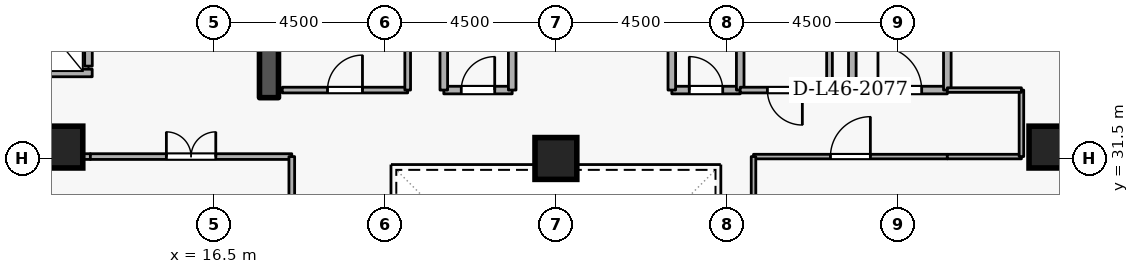
"""IFC4 building model, lengths in metres.
Left out: names, types, materials, properties, quantities, classifications, styles, units other than length and angle.
Written with IfcOpenShell. Run it as: python <this file> out.ifc"""

import sys

from ifc_helpers import new_model, si_unit, direction, frame, frame_2d, origin, origin_2d, place, context, subcontext, project, spatial, rectangle, extrude, element, fill, save


model = new_model("IFC4")
c1 = context("Model", 3, precision=1e-05, world=origin(), true_north=direction((0.0, 1.0)))
c2 = subcontext(c1, "Body", "Model", "MODEL_VIEW")
j1 = project(units=[si_unit("LENGTHUNIT", "METRE"), si_unit("PLANEANGLEUNIT", "RADIAN")], contexts=[c1])
p1 = place(None, origin())
s1 = spatial("IfcSite", under=j1, at=p1, CompositionType="ELEMENT")
p2 = place(p1, origin())
s2 = spatial("IfcBuilding", under=s1, at=p2, CompositionType="ELEMENT")
p3 = place(p2, frame((0.0, 0.0, 174.3)))
s3 = spatial("IfcBuildingStorey", under=s2, at=p3, CompositionType="ELEMENT", Elevation=174.3)
p4 = place(p3, frame((17.95, 33.1, 0.0), z_axis=(0.0, 0.0, 1.0), x_axis=(0.0, 1.0, 0.0)))
e1 = element("IfcWall", 1, at=p4, inside=s3, PredefinedType="SHEAR", context=c2, shape_type="SweptSolid", body=[
    extrude(rectangle(XDim=5.8, YDim=0.5, at=frame_2d((2.9, 0.0))), origin(), (0.0, 0.0, 1.0), 4.2),
])
for number, where, z_axis, x_axis in (
    (2, (12.5, 31.8, 0.0), (0.0, 0.0, 1.0), (1.0, 0.0, 0.0)),
    (3, (38.5, 31.8, 0.0), (0.0, 0.0, 1.0), (1.0, 0.0, 0.0)),
    (4, (25.5, 31.5, 0.0), (0.0, 0.0, 1.0), (1.0, 0.0, 0.0)),
):
    element("IfcColumn", number, at=place(p3, frame(where, z_axis=z_axis, x_axis=x_axis)), inside=s3, PredefinedType="COLUMN", context=c2, shape_type="SweptSolid", body=[
        extrude(rectangle(XDim=1.1, YDim=1.1, at=origin_2d()), origin(), (0.0, 0.0, 1.0), 4.2),
    ])
p5 = place(p3, frame((13.2, 33.93, 0.0), z_axis=(0.0, 0.0, 1.0), x_axis=(0.0, 1.0, 0.0)))
e5 = element("IfcWall", 5, at=p5, inside=s3, PredefinedType="STANDARD", context=c2, shape_type="SweptSolid", body=[
    extrude(rectangle(XDim=1.94, YDim=0.2, at=frame_2d((0.97, 0.0))), origin(), (0.0, 0.0, 1.0), 3.94),
])
p6 = place(p5, frame((0.46, 0.0, 0.0)))
e6 = element("IfcOpeningElement", 6, at=p6, cuts=e5, PredefinedType="OPENING", context=c2, shape_type="SweptSolid", body=[
    extrude(rectangle(XDim=1.02, YDim=2.06, at=frame_2d((0.51, 1.03))), frame((0.0, 0.11, 0.0), z_axis=(0.0, -1.0, 0.0), x_axis=(1.0, 0.0, 0.0)), (0.0, 0.0, 1.0), 0.22),
])
p7 = place(p3, frame((11.002, 33.75, 0.0), z_axis=(0.0, 0.0, 1.0), x_axis=(1.0, 0.0, 0.0)))
e7 = element("IfcWall", 7, at=p7, inside=s3, PredefinedType="STANDARD", context=c2, shape_type="SweptSolid", body=[
    extrude(rectangle(XDim=2.296, YDim=0.2, at=frame_2d((1.148, 0.0))), origin(), (0.0, 0.0, 1.0), 3.94),
])
p8 = place(p3, frame((33.3, 33.3, 0.0), z_axis=(0.0, 0.0, 1.0), x_axis=(1.0, 0.0, 0.0)))
e8 = element("IfcWall", 8, at=p8, inside=s3, PredefinedType="STANDARD", context=c2, shape_type="SweptSolid", body=[
    extrude(rectangle(XDim=2.5, YDim=0.2, at=frame_2d((1.25, 0.0))), origin(), (0.0, 0.0, 1.0), 3.94),
])
p9 = place(p8, frame((0.675, 0.0, 0.0)))
e9 = element("IfcOpeningElement", 9, at=p9, cuts=e8, PredefinedType="OPENING", context=c2, shape_type="SweptSolid", body=[
    extrude(rectangle(XDim=1.15, YDim=2.1, at=frame_2d((0.575, 1.05))), frame((0.0, 0.11, 0.0), z_axis=(0.0, -1.0, 0.0), x_axis=(1.0, 0.0, 0.0)), (0.0, 0.0, 1.0), 0.22),
])
p10 = place(p3, frame((35.8, 33.3, 0.0), z_axis=(0.0, 0.0, 1.0), x_axis=(0.0, 1.0, 0.0)))
e10 = element("IfcWall", 10, at=p10, inside=s3, PredefinedType="STANDARD", context=c2, shape_type="SweptSolid", body=[
    extrude(rectangle(XDim=5.7, YDim=0.2, at=frame_2d((2.85, 0.0))), origin(), (0.0, 0.0, 1.0), 3.94),
])
p11 = place(p3, frame((33.3, 35.6, 0.0), z_axis=(0.0, 0.0, 1.0), x_axis=(0.0, -1.0, 0.0)))
e11 = element("IfcWall", 11, at=p11, inside=s3, PredefinedType="STANDARD", context=c2, shape_type="SweptSolid", body=[
    extrude(rectangle(XDim=2.3, YDim=0.2, at=frame_2d((1.15, 0.0))), origin(), (0.0, 0.0, 1.0), 3.145),
])
p12 = place(p3, frame((22.55, 33.3, 0.0), z_axis=(0.0, 0.0, 1.0), x_axis=(1.0, 0.0, 0.0)))
e12 = element("IfcWall", 12, at=p12, inside=s3, PredefinedType="STANDARD", context=c2, shape_type="SweptSolid", body=[
    extrude(rectangle(XDim=1.8, YDim=0.2, at=frame_2d((0.9, 0.0))), origin(), (0.0, 0.0, 1.0), 3.94),
])
p13 = place(p12, frame((0.46, 0.0, 0.0)))
e13 = element("IfcOpeningElement", 13, at=p13, cuts=e12, PredefinedType="OPENING", context=c2, shape_type="SweptSolid", body=[
    extrude(rectangle(XDim=0.88, YDim=2.04, at=frame_2d((0.44, 1.02))), frame((0.0, 0.11, 0.0), z_axis=(0.0, -1.0, 0.0), x_axis=(1.0, 0.0, 0.0)), (0.0, 0.0, 1.0), 0.22),
])
for number, where, z_axis, x_axis in (
    (14, (24.35, 33.3, 0.0), (0.0, 0.0, 1.0), (0.0, 1.0, 0.0)),
    (15, (22.55, 35.35, 0.0), (0.0, 0.0, 1.0), (0.0, -1.0, 0.0)),
):
    element("IfcWall", number, at=place(p3, frame(where, z_axis=z_axis, x_axis=x_axis)), inside=s3, PredefinedType="STANDARD", context=c2, shape_type="SweptSolid", body=[
        extrude(rectangle(XDim=2.05, YDim=0.2, at=frame_2d((1.025, 0.0))), origin(), (0.0, 0.0, 1.0), 3.94),
    ])
p14 = place(p3, frame((28.55, 33.3, 0.0), z_axis=(0.0, 0.0, 1.0), x_axis=(1.0, 0.0, 0.0)))
e16 = element("IfcWall", 16, at=p14, inside=s3, PredefinedType="STANDARD", context=c2, shape_type="SweptSolid", body=[
    extrude(rectangle(XDim=1.8, YDim=0.2, at=frame_2d((0.9, 0.0))), origin(), (0.0, 0.0, 1.0), 3.94),
])
p15 = place(p14, frame((0.46, 0.0, 0.0)))
e17 = element("IfcOpeningElement", 17, at=p15, cuts=e16, PredefinedType="OPENING", context=c2, shape_type="SweptSolid", body=[
    extrude(rectangle(XDim=0.88, YDim=2.04, at=frame_2d((0.44, 1.02))), frame((0.0, 0.11, 0.0), z_axis=(0.0, -1.0, 0.0), x_axis=(1.0, 0.0, 0.0)), (0.0, 0.0, 1.0), 0.22),
])
for number, where, z_axis, x_axis in (
    (18, (30.35, 33.3, 0.0), (0.0, 0.0, 1.0), (0.0, 1.0, 0.0)),
    (19, (28.55, 35.35, 0.0), (0.0, 0.0, 1.0), (0.0, -1.0, 0.0)),
):
    element("IfcWall", number, at=place(p3, frame(where, z_axis=z_axis, x_axis=x_axis)), inside=s3, PredefinedType="STANDARD", context=c2, shape_type="SweptSolid", body=[
        extrude(rectangle(XDim=2.05, YDim=0.2, at=frame_2d((1.025, 0.0))), origin(), (0.0, 0.0, 1.0), 3.94),
    ])
p16 = place(p3, frame((18.3, 33.3, 0.0), z_axis=(0.0, 0.0, 1.0), x_axis=(1.0, 0.0, 0.0)))
e20 = element("IfcWall", 20, at=p16, inside=s3, PredefinedType="PARTITIONING", context=c2, shape_type="SweptSolid", body=[
    extrude(rectangle(XDim=3.3, YDim=0.15, at=frame_2d((1.65, 0.0))), origin(), (0.0, 0.0, 1.0), 3.94),
])
p17 = place(p16, frame((1.19, 0.0, 0.0)))
e21 = element("IfcOpeningElement", 21, at=p17, cuts=e20, PredefinedType="OPENING", context=c2, shape_type="SweptSolid", body=[
    extrude(rectangle(XDim=0.92, YDim=2.08, at=frame_2d((0.46, 1.04))), frame((0.0, 0.085, 0.0), z_axis=(0.0, -1.0, 0.0), x_axis=(1.0, 0.0, 0.0)), (0.0, 0.0, 1.0), 0.17),
])
p18 = place(p3, frame((21.6, 33.3, 0.0), z_axis=(0.0, 0.0, 1.0), x_axis=(0.0, 1.0, 0.0)))
e22 = element("IfcWall", 22, at=p18, inside=s3, PredefinedType="PARTITIONING", context=c2, shape_type="SweptSolid", body=[
    extrude(rectangle(XDim=2.05, YDim=0.15, at=frame_2d((1.025, 0.0))), origin(), (0.0, 0.0, 1.0), 3.94),
])
p19 = place(p3, frame((32.7, 35.35, 0.0), z_axis=(0.0, 0.0, 1.0), x_axis=(0.0, -1.0, 0.0)))
e23 = element("IfcWall", 23, at=p19, inside=s3, PredefinedType="PARTITIONING", context=c2, shape_type="SweptSolid", body=[
    extrude(rectangle(XDim=2.05, YDim=0.15, at=frame_2d((1.025, 0.0))), origin(), (0.0, 0.0, 1.0), 3.145),
])
p20 = place(p3, frame((32.7, 33.3, 0.0), z_axis=(0.0, 0.0, 1.0), x_axis=(-1.0, 0.0, 0.0)))
e24 = element("IfcWall", 24, at=p20, inside=s3, PredefinedType="PARTITIONING", context=c2, shape_type="SweptSolid", body=[
    extrude(rectangle(XDim=2.35, YDim=0.15, at=frame_2d((1.175, 0.0))), origin(), (0.0, 0.0, 1.0), 3.94),
])
p21 = place(p20, frame((0.715, 0.0, 0.0)))
e25 = element("IfcOpeningElement", 25, at=p21, cuts=e24, PredefinedType="OPENING", context=c2, shape_type="SweptSolid", body=[
    extrude(rectangle(XDim=0.92, YDim=2.08, at=frame_2d((0.46, 1.04))), frame((0.0, 0.085, 0.0), z_axis=(0.0, -1.0, 0.0), x_axis=(1.0, 0.0, 0.0)), (0.0, 0.0, 1.0), 0.17),
])
p22 = place(p3, frame((7.78, 31.55, 0.0), z_axis=(0.0, 0.0, 1.0), x_axis=(1.0, 0.0, 0.0)))
e26 = element("IfcWall", 26, at=p22, inside=s3, PredefinedType="PARTITIONING", context=c2, shape_type="SweptSolid", body=[
    extrude(rectangle(XDim=5.47, YDim=0.15, at=frame_2d((2.735, 0.0))), origin(), (0.0, 0.0, 1.0), 3.94),
])
p23 = place(p3, frame((13.25, 31.55, 0.0), z_axis=(0.0, 0.0, 1.0), x_axis=(1.0, 0.0, 0.0)))
e27 = element("IfcWall", 27, at=p23, inside=s3, PredefinedType="PARTITIONING", context=c2, shape_type="SweptSolid", body=[
    extrude(rectangle(XDim=5.3, YDim=0.15, at=frame_2d((2.65, 0.0))), origin(), (0.0, 0.0, 1.0), 3.94),
])
p24 = place(p23, frame((2.0, 0.0, 0.0)))
e28 = element("IfcOpeningElement", 28, at=p24, cuts=e27, PredefinedType="OPENING", context=c2, shape_type="SweptSolid", body=[
    extrude(rectangle(XDim=1.3, YDim=2.12, at=frame_2d((0.65, 1.06))), frame((0.0, 0.085, 0.0), z_axis=(0.0, -1.0, 0.0), x_axis=(1.0, 0.0, 0.0)), (0.0, 0.0, 1.0), 0.17),
])
p25 = place(p3, frame((18.55, 31.55, 0.0), z_axis=(0.0, 0.0, 1.0), x_axis=(0.0, -1.0, 0.0)))
e29 = element("IfcWall", 29, at=p25, inside=s3, PredefinedType="PARTITIONING", context=c2, shape_type="SweptSolid", body=[
    extrude(rectangle(XDim=4.55, YDim=0.15, at=frame_2d((2.275, 0.0))), origin(), (0.0, 0.0, 1.0), 3.94),
])
p26 = place(p3, frame((30.7, 31.55, 0.0), z_axis=(0.0, 0.0, 1.0), x_axis=(1.0, 0.0, 0.0)))
e30 = element("IfcWall", 30, at=p26, inside=s3, PredefinedType="PARTITIONING", context=c2, shape_type="SweptSolid", body=[
    extrude(rectangle(XDim=5.1, YDim=0.12, at=frame_2d((2.55, 0.0))), origin(), (0.0, 0.0, 1.0), 3.94),
])
p27 = place(p26, frame((2.025, 0.0, 0.0)))
e31 = element("IfcOpeningElement", 31, at=p27, cuts=e30, PredefinedType="OPENING", context=c2, shape_type="SweptSolid", body=[
    extrude(rectangle(XDim=1.05, YDim=2.1, at=frame_2d((0.525, 1.05))), frame((0.0, 0.07, 0.0), z_axis=(0.0, -1.0, 0.0), x_axis=(1.0, 0.0, 0.0)), (0.0, 0.0, 1.0), 0.14),
])
p28 = place(p3, frame((35.8, 31.55, 0.0), z_axis=(0.0, 0.0, 1.0), x_axis=(1.0, 0.0, 0.0)))
e32 = element("IfcWall", 32, at=p28, inside=s3, PredefinedType="PARTITIONING", context=c2, shape_type="SweptSolid", body=[
    extrude(rectangle(XDim=1.95, YDim=0.12, at=frame_2d((0.975, 0.0))), origin(), (0.0, 0.0, 1.0), 3.94),
])
p29 = place(p3, frame((37.75, 31.55, 0.0), z_axis=(0.0, 0.0, 1.0), x_axis=(0.0, 1.0, 0.0)))
e33 = element("IfcWall", 33, at=p29, inside=s3, PredefinedType="PARTITIONING", context=c2, shape_type="SweptSolid", body=[
    extrude(rectangle(XDim=1.75, YDim=0.12, at=frame_2d((0.875, 0.0))), origin(), (0.0, 0.0, 1.0), 3.94),
])
p30 = place(p3, frame((37.75, 33.3, 0.0), z_axis=(0.0, 0.0, 1.0), x_axis=(-1.0, 0.0, 0.0)))
e34 = element("IfcWall", 34, at=p30, inside=s3, PredefinedType="PARTITIONING", context=c2, shape_type="SweptSolid", body=[
    extrude(rectangle(XDim=1.95, YDim=0.12, at=frame_2d((0.975, 0.0))), origin(), (0.0, 0.0, 1.0), 3.94),
])
p31 = place(p3, frame((30.7, 27.0, 0.0), z_axis=(0.0, 0.0, 1.0), x_axis=(0.0, 1.0, 0.0)))
e35 = element("IfcWall", 35, at=p31, inside=s3, PredefinedType="PARTITIONING", context=c2, shape_type="SweptSolid", body=[
    extrude(rectangle(XDim=4.55, YDim=0.12, at=frame_2d((2.275, 0.0))), origin(), (0.0, 0.0, 1.0), 3.94),
])
p32 = place(p9, origin())
e36 = element("IfcDoor", 36, at=p32, inside=s3, OperationType="SINGLE_SWING_LEFT", PredefinedType="DOOR", context=c2, shape_type="SweptSolid", body=[
    extrude(rectangle(XDim=1.15, YDim=2.1, at=frame_2d((0.575, 1.05))), frame((0.0, 0.025, 0.0), z_axis=(0.0, -1.0, 0.0), x_axis=(1.0, 0.0, 0.0)), (0.0, 0.0, 1.0), 0.05),
])
fill(e9, e36)
p33 = place(p13, origin())
e37 = element("IfcDoor", 37, at=p33, inside=s3, OperationType="SINGLE_SWING_RIGHT", PredefinedType="DOOR", context=c2, shape_type="SweptSolid", body=[
    extrude(rectangle(XDim=0.88, YDim=2.04, at=frame_2d((0.44, 1.02))), frame((0.0, 0.025, 0.0), z_axis=(0.0, -1.0, 0.0), x_axis=(1.0, 0.0, 0.0)), (0.0, 0.0, 1.0), 0.05),
])
fill(e13, e37)
p34 = place(p15, origin())
e38 = element("IfcDoor", 38, at=p34, inside=s3, OperationType="SINGLE_SWING_LEFT", PredefinedType="DOOR", context=c2, shape_type="SweptSolid", body=[
    extrude(rectangle(XDim=0.88, YDim=2.04, at=frame_2d((0.44, 1.02))), frame((0.0, 0.025, 0.0), z_axis=(0.0, -1.0, 0.0), x_axis=(1.0, 0.0, 0.0)), (0.0, 0.0, 1.0), 0.05),
])
fill(e17, e38)
p35 = place(p17, origin())
e39 = element("IfcDoor", 39, at=p35, inside=s3, OperationType="SINGLE_SWING_RIGHT", PredefinedType="DOOR", context=c2, shape_type="SweptSolid", body=[
    extrude(rectangle(XDim=0.92, YDim=2.08, at=frame_2d((0.46, 1.04))), frame((0.0, 0.025, 0.0), z_axis=(0.0, -1.0, 0.0), x_axis=(1.0, 0.0, 0.0)), (0.0, 0.0, 1.0), 0.05),
])
fill(e21, e39)
p36 = place(p21, origin())
e40 = element("IfcDoor", 40, at=p36, inside=s3, OperationType="SINGLE_SWING_LEFT", PredefinedType="DOOR", context=c2, shape_type="SweptSolid", body=[
    extrude(rectangle(XDim=0.92, YDim=2.08, at=frame_2d((0.46, 1.04))), frame((0.0, 0.025, 0.0), z_axis=(0.0, -1.0, 0.0), x_axis=(1.0, 0.0, 0.0)), (0.0, 0.0, 1.0), 0.05),
])
fill(e25, e40)
p37 = place(p24, origin())
e41 = element("IfcDoor", 41, at=p37, inside=s3, OperationType="DOUBLE_DOOR_SINGLE_SWING", PredefinedType="DOOR", context=c2, shape_type="SweptSolid", body=[
    extrude(rectangle(XDim=1.3, YDim=2.12, at=frame_2d((0.65, 1.06))), frame((0.0, 0.025, 0.0), z_axis=(0.0, -1.0, 0.0), x_axis=(1.0, 0.0, 0.0)), (0.0, 0.0, 1.0), 0.05),
])
fill(e28, e41)
p38 = place(p27, origin())
e42 = element("IfcDoor", 42, at=p38, inside=s3, OperationType="SINGLE_SWING_RIGHT", PredefinedType="DOOR", context=c2, shape_type="SweptSolid", body=[
    extrude(rectangle(XDim=1.05, YDim=2.1, at=frame_2d((0.525, 1.05))), frame((0.0, 0.025, 0.0), z_axis=(0.0, -1.0, 0.0), x_axis=(1.0, 0.0, 0.0)), (0.0, 0.0, 1.0), 0.05),
])
fill(e31, e42)
save(model, sys.argv[1])
